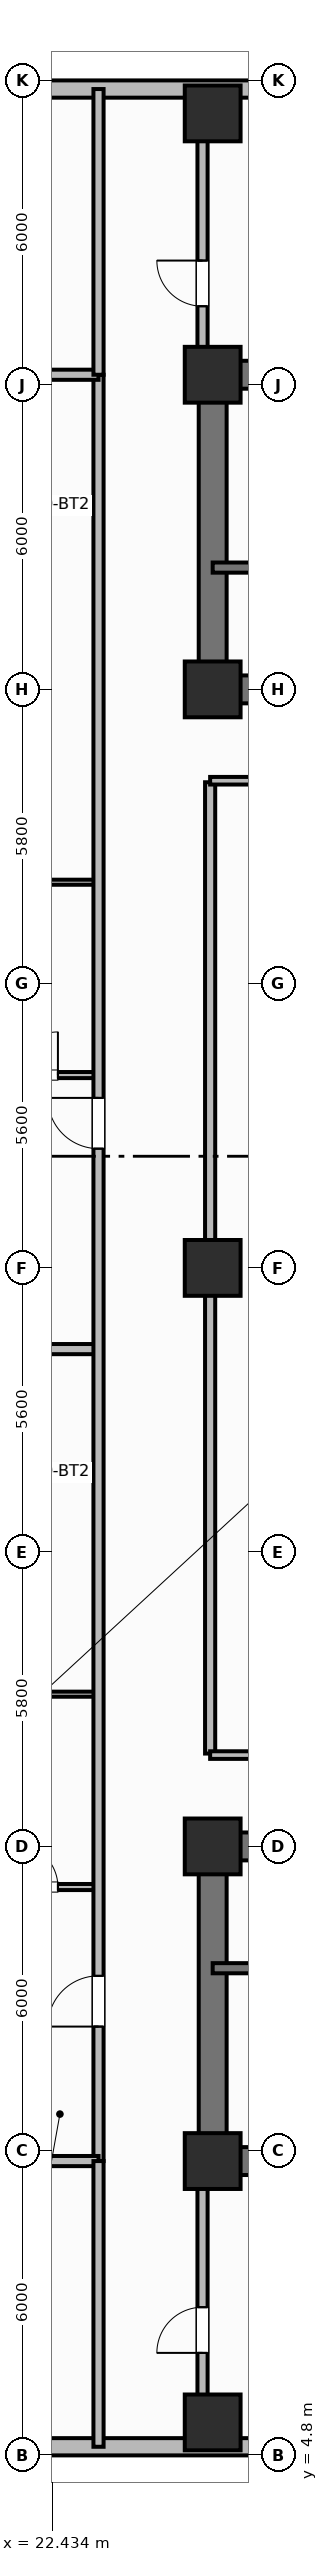
"""IFC4 building model, lengths in metres.
Left out: names, types, materials, properties, quantities, classifications, styles, units other than length and angle.
Written with IfcOpenShell. Run it as: python <this file> out.ifc"""

import sys

from ifc_helpers import new_model, si_unit, direction, frame, frame_2d, origin, origin_2d, place, context, subcontext, project, spatial, rectangle, extrude, element, fill, save


model = new_model("IFC4")
c1 = context("Model", 3, precision=1e-05, world=origin(), true_north=direction((0.0, 1.0)))
c2 = subcontext(c1, "Body", "Model", "MODEL_VIEW")
j1 = project(units=[si_unit("LENGTHUNIT", "METRE"), si_unit("PLANEANGLEUNIT", "RADIAN")], contexts=[c1])
p1 = place(None, origin())
s1 = spatial("IfcSite", under=j1, at=p1, CompositionType="ELEMENT")
p2 = place(p1, origin())
s2 = spatial("IfcBuilding", under=s1, at=p2, CompositionType="ELEMENT")
p3 = place(p2, frame((0.0, 0.0, 125.3)))
s3 = spatial("IfcBuildingStorey", under=s2, at=p3, CompositionType="ELEMENT", Elevation=125.3)
p4 = place(p3, frame((52.8, 10.6, 0.0), z_axis=(0.0, 0.0, 1.0), x_axis=(-1.0, 0.0, 0.0)))
e1 = element("IfcWall", 1, at=p4, inside=s3, PredefinedType="SHEAR", context=c2, shape_type="SweptSolid", body=[
    extrude(rectangle(XDim=27.2, YDim=0.55, at=frame_2d((13.6, 0.0))), origin(), (0.0, 0.0, 1.0), 3.7),
])
p5 = place(p3, frame((25.6, 10.875, 0.0), z_axis=(0.0, 0.0, 1.0), x_axis=(0.0, 1.0, 0.0)))
e2 = element("IfcWall", 2, at=p5, inside=s3, PredefinedType="SHEAR", context=c2, shape_type="SweptSolid", body=[
    extrude(rectangle(XDim=5.65, YDim=0.55, at=frame_2d((2.825, 0.0))), origin(), (0.0, 0.0, 1.0), 3.7),
])
p6 = place(p3, frame((25.6, 16.8, 0.0), z_axis=(0.0, 0.0, 1.0), x_axis=(1.0, 0.0, 0.0)))
e3 = element("IfcWall", 3, at=p6, inside=s3, PredefinedType="SHEAR", context=c2, shape_type="SweptSolid", body=[
    extrude(rectangle(XDim=27.2, YDim=0.55, at=frame_2d((13.6, 0.0))), origin(), (0.0, 0.0, 1.0), 3.7),
])
p7 = place(p6, frame((1.9, 0.0, 0.0)))
e4 = element("IfcOpeningElement", 4, at=p7, cuts=e3, PredefinedType="OPENING", context=c2, shape_type="SweptSolid", body=[
    extrude(rectangle(XDim=1.1, YDim=2.15, at=frame_2d((0.55, 1.075))), frame((0.0, 0.285, 0.0), z_axis=(0.0, -1.0, 0.0), x_axis=(1.0, 0.0, 0.0)), (0.0, 0.0, 1.0), 0.57),
])
p8 = place(p6, frame((13.0, 0.0, 0.0)))
e5 = element("IfcOpeningElement", 5, at=p8, cuts=e3, PredefinedType="OPENING", context=c2, shape_type="SweptSolid", body=[
    extrude(rectangle(XDim=1.2, YDim=2.15, at=frame_2d((0.6, 1.075))), frame((0.0, 0.285, 0.0), z_axis=(0.0, -1.0, 0.0), x_axis=(1.0, 0.0, 0.0)), (0.0, 0.0, 1.0), 0.57),
])
p9 = place(p6, frame((21.6, 0.0, 0.0)))
e6 = element("IfcOpeningElement", 6, at=p9, cuts=e3, PredefinedType="OPENING", context=c2, shape_type="SweptSolid", body=[
    extrude(rectangle(XDim=1.0, YDim=2.15, at=frame_2d((0.5, 1.075))), frame((0.0, 0.285, 0.0), z_axis=(0.0, -1.0, 0.0), x_axis=(1.0, 0.0, 0.0)), (0.0, 0.0, 1.0), 0.57),
])
p10 = place(p3, frame((25.6, 45.8, 0.0), z_axis=(0.0, 0.0, 1.0), x_axis=(1.0, 0.0, 0.0)))
e7 = element("IfcWall", 7, at=p10, inside=s3, PredefinedType="SHEAR", context=c2, shape_type="SweptSolid", body=[
    extrude(rectangle(XDim=27.2, YDim=0.55, at=frame_2d((13.6, 0.0))), origin(), (0.0, 0.0, 1.0), 3.7),
])
p11 = place(p3, frame((25.6, 39.875, 0.0), z_axis=(0.0, 0.0, 1.0), x_axis=(0.0, 1.0, 0.0)))
e8 = element("IfcWall", 8, at=p11, inside=s3, PredefinedType="SHEAR", context=c2, shape_type="SweptSolid", body=[
    extrude(rectangle(XDim=5.65, YDim=0.55, at=frame_2d((2.825, 0.0))), origin(), (0.0, 0.0, 1.0), 3.7),
])
p12 = place(p3, frame((52.8, 39.6, 0.0), z_axis=(0.0, 0.0, 1.0), x_axis=(-1.0, 0.0, 0.0)))
e9 = element("IfcWall", 9, at=p12, inside=s3, PredefinedType="SHEAR", context=c2, shape_type="SweptSolid", body=[
    extrude(rectangle(XDim=27.2, YDim=0.55, at=frame_2d((13.6, 0.0))), origin(), (0.0, 0.0, 1.0), 3.7),
])
p13 = place(p12, frame((24.2, 0.0, 0.0)))
e10 = element("IfcOpeningElement", 10, at=p13, cuts=e9, PredefinedType="OPENING", context=c2, shape_type="SweptSolid", body=[
    extrude(rectangle(XDim=1.1, YDim=2.15, at=frame_2d((0.55, 1.075))), frame((0.0, 0.285, 0.0), z_axis=(0.0, -1.0, 0.0), x_axis=(1.0, 0.0, 0.0)), (0.0, 0.0, 1.0), 0.57),
])
p14 = place(p12, frame((15.1, 0.0, 0.0)))
e11 = element("IfcOpeningElement", 11, at=p14, cuts=e9, PredefinedType="OPENING", context=c2, shape_type="SweptSolid", body=[
    extrude(rectangle(XDim=1.2, YDim=2.15, at=frame_2d((0.6, 1.075))), frame((0.0, 0.285, 0.0), z_axis=(0.0, -1.0, 0.0), x_axis=(1.0, 0.0, 0.0)), (0.0, 0.0, 1.0), 0.57),
])
p15 = place(p12, frame((11.3, 0.0, 0.0)))
e12 = element("IfcOpeningElement", 12, at=p15, cuts=e9, PredefinedType="OPENING", context=c2, shape_type="SweptSolid", body=[
    extrude(rectangle(XDim=1.3, YDim=2.2, at=frame_2d((0.65, 1.1))), frame((0.0, 0.285, 0.0), z_axis=(0.0, -1.0, 0.0), x_axis=(1.0, 0.0, 0.0)), (0.0, 0.0, 1.0), 0.57),
])
p16 = place(p12, frame((7.25, 0.0, 0.0)))
e13 = element("IfcOpeningElement", 13, at=p16, cuts=e9, PredefinedType="OPENING", context=c2, shape_type="SweptSolid", body=[
    extrude(rectangle(XDim=0.85, YDim=2.1, at=frame_2d((0.425, 1.05))), frame((0.0, 0.285, 0.0), z_axis=(0.0, -1.0, 0.0), x_axis=(1.0, 0.0, 0.0)), (0.0, 0.0, 1.0), 0.57),
])
p17 = place(p12, frame((3.0, 0.0, 0.0)))
e14 = element("IfcOpeningElement", 14, at=p17, cuts=e9, PredefinedType="OPENING", context=c2, shape_type="SweptSolid", body=[
    extrude(rectangle(XDim=0.9, YDim=2.1, at=frame_2d((0.45, 1.05))), frame((0.0, 0.285, 0.0), z_axis=(0.0, -1.0, 0.0), x_axis=(1.0, 0.0, 0.0)), (0.0, 0.0, 1.0), 0.57),
])
for number, where, z_axis, x_axis in (
    (15, (25.6, 10.6, 0.0), (0.0, 0.0, 1.0), (1.0, 0.0, 0.0)),
    (16, (25.6, 16.8, 0.0), (0.0, 0.0, 1.0), (1.0, 0.0, 0.0)),
    (17, (25.6, 39.6, 0.0), (0.0, 0.0, 1.0), (1.0, 0.0, 0.0)),
    (18, (25.6, 45.8, 0.0), (0.0, 0.0, 1.0), (1.0, 0.0, 0.0)),
    (19, (25.6, 28.2, 0.0), (0.0, 0.0, 1.0), (1.0, 0.0, 0.0)),
    (20, (25.6, 5.45, 0.0), (0.0, 0.0, 1.0), (1.0, 0.0, 0.0)),
    (21, (25.6, 50.95, 0.0), (0.0, 0.0, 1.0), (1.0, 0.0, 0.0)),
):
    element("IfcColumn", number, at=place(p3, frame(where, z_axis=z_axis, x_axis=x_axis)), inside=s3, PredefinedType="COLUMN", context=c2, shape_type="SweptSolid", body=[
        extrude(rectangle(XDim=1.1, YDim=1.1, at=origin_2d()), origin(), (0.0, 0.0, 1.0), 3.7),
    ])
p18 = place(p3, frame((18.6, 4.97, 0.0), z_axis=(0.0, 0.0, 1.0), x_axis=(1.0, 0.0, 0.0)))
e22 = element("IfcWall", 22, at=p18, inside=s3, PredefinedType="SOLIDWALL", context=c2, shape_type="SweptSolid", body=[
    extrude(rectangle(XDim=17.4, YDim=0.34, at=frame_2d((8.7, 0.0))), origin(), (0.0, 0.0, 1.0), 2.7),
])
p19 = place(p18, frame((1.46, 0.0, 0.68)))
e23 = element("IfcOpeningElement", 23, at=p19, cuts=e22, PredefinedType="OPENING", context=c2, shape_type="SweptSolid", body=[
    extrude(rectangle(XDim=1.6, YDim=1.9, at=frame_2d((0.8, 0.95))), frame((0.0, 0.18, 0.0), z_axis=(0.0, -1.0, 0.0), x_axis=(1.0, 0.0, 0.0)), (0.0, 0.0, 1.0), 0.36),
])
p20 = place(p18, frame((8.25, 0.0, 0.68)))
e24 = element("IfcOpeningElement", 24, at=p20, cuts=e22, PredefinedType="OPENING", context=c2, shape_type="SweptSolid", body=[
    extrude(rectangle(XDim=1.6, YDim=1.9, at=frame_2d((0.8, 0.95))), frame((0.0, 0.18, 0.0), z_axis=(0.0, -1.0, 0.0), x_axis=(1.0, 0.0, 0.0)), (0.0, 0.0, 1.0), 0.36),
])
p21 = place(p18, frame((10.77, 0.0, 0.68)))
e25 = element("IfcOpeningElement", 25, at=p21, cuts=e22, PredefinedType="OPENING", context=c2, shape_type="SweptSolid", body=[
    extrude(rectangle(XDim=1.6, YDim=1.9, at=frame_2d((0.8, 0.95))), frame((0.0, 0.18, 0.0), z_axis=(0.0, -1.0, 0.0), x_axis=(1.0, 0.0, 0.0)), (0.0, 0.0, 1.0), 0.36),
])
p22 = place(p18, frame((13.64, 0.0, 0.68)))
e26 = element("IfcOpeningElement", 26, at=p22, cuts=e22, PredefinedType="OPENING", context=c2, shape_type="SweptSolid", body=[
    extrude(rectangle(XDim=1.6, YDim=1.9, at=frame_2d((0.8, 0.95))), frame((0.0, 0.18, 0.0), z_axis=(0.0, -1.0, 0.0), x_axis=(1.0, 0.0, 0.0)), (0.0, 0.0, 1.0), 0.36),
])
p23 = place(p3, frame((36.0, 51.43, 0.0), z_axis=(0.0, 0.0, 1.0), x_axis=(-1.0, 0.0, 0.0)))
e27 = element("IfcWall", 27, at=p23, inside=s3, PredefinedType="SOLIDWALL", context=c2, shape_type="SweptSolid", body=[
    extrude(rectangle(XDim=17.4, YDim=0.34, at=frame_2d((8.7, 0.0))), origin(), (0.0, 0.0, 1.0), 2.7),
])
p24 = place(p23, frame((5.637, 0.0, 0.68)))
e28 = element("IfcOpeningElement", 28, at=p24, cuts=e27, PredefinedType="OPENING", context=c2, shape_type="SweptSolid", body=[
    extrude(rectangle(XDim=2.1, YDim=1.9, at=frame_2d((1.05, 0.95))), frame((0.0, 0.18, 0.0), z_axis=(0.0, -1.0, 0.0), x_axis=(1.0, 0.0, 0.0)), (0.0, 0.0, 1.0), 0.36),
])
p25 = place(p23, frame((13.688, 0.0, 0.68)))
e29 = element("IfcOpeningElement", 29, at=p25, cuts=e27, PredefinedType="OPENING", context=c2, shape_type="SweptSolid", body=[
    extrude(rectangle(XDim=2.1, YDim=1.9, at=frame_2d((1.05, 0.95))), frame((0.0, 0.18, 0.0), z_axis=(0.0, -1.0, 0.0), x_axis=(1.0, 0.0, 0.0)), (0.0, 0.0, 1.0), 0.36),
])
p26 = place(p3, frame((25.6, 14.4, 0.0), z_axis=(0.0, 0.0, 1.0), x_axis=(1.0, 0.0, 0.0)))
e30 = element("IfcWall", 30, at=p26, inside=s3, PredefinedType="SHEAR", context=c2, shape_type="SweptSolid", body=[
    extrude(rectangle(XDim=9.55, YDim=0.2, at=frame_2d((4.775, 0.0))), origin(), (0.0, 0.0, 1.0), 3.7),
])
p27 = place(p26, frame((1.05, 0.0, 0.0)))
e31 = element("IfcOpeningElement", 31, at=p27, cuts=e30, PredefinedType="OPENING", context=c2, shape_type="SweptSolid", body=[
    extrude(rectangle(XDim=1.1, YDim=2.15, at=frame_2d((0.55, 1.075))), frame((0.0, 0.11, 0.0), z_axis=(0.0, -1.0, 0.0), x_axis=(1.0, 0.0, 0.0)), (0.0, 0.0, 1.0), 0.22),
])
p28 = place(p3, frame((35.15, 42.0, 0.0), z_axis=(0.0, 0.0, 1.0), x_axis=(-1.0, 0.0, 0.0)))
e32 = element("IfcWall", 32, at=p28, inside=s3, PredefinedType="SHEAR", context=c2, shape_type="SweptSolid", body=[
    extrude(rectangle(XDim=9.55, YDim=0.2, at=frame_2d((4.775, 0.0))), origin(), (0.0, 0.0, 1.0), 3.7),
])
p29 = place(p28, frame((7.25, 0.0, 0.0)))
e33 = element("IfcOpeningElement", 33, at=p29, cuts=e32, PredefinedType="OPENING", context=c2, shape_type="SweptSolid", body=[
    extrude(rectangle(XDim=1.1, YDim=2.15, at=frame_2d((0.55, 1.075))), frame((0.0, 0.11, 0.0), z_axis=(0.0, -1.0, 0.0), x_axis=(1.0, 0.0, 0.0)), (0.0, 0.0, 1.0), 0.22),
])
p30 = place(p3, frame((25.55, 18.63, 0.0), z_axis=(0.0, 0.0, 1.0), x_axis=(0.0, 1.0, 0.0)))
e34 = element("IfcWall", 34, at=p30, inside=s3, PredefinedType="PARTITIONING", context=c2, shape_type="SweptSolid", body=[
    extrude(rectangle(XDim=19.14, YDim=0.2, at=frame_2d((9.57, 0.0))), origin(), (0.0, 0.0, 1.0), 2.53),
])
for number, where, z_axis, x_axis in (
    (35, (25.55, 18.6, 0.0), (0.0, 0.0, 1.0), (1.0, 0.0, 0.0)),
    (36, (25.55, 37.8, 0.0), (0.0, 0.0, 1.0), (1.0, 0.0, 0.0)),
):
    element("IfcWall", number, at=place(p3, frame(where, z_axis=z_axis, x_axis=x_axis)), inside=s3, PredefinedType="PARTITIONING", context=c2, shape_type="SweptSolid", body=[
        extrude(rectangle(XDim=6.5, YDim=0.15, at=frame_2d((3.25, 0.0))), origin(), (0.0, 0.0, 1.0), 2.53),
    ])
p31 = place(p3, frame((21.1, 16.0, 0.0), z_axis=(0.0, 0.0, 1.0), x_axis=(1.0, 0.0, 0.0)))
e37 = element("IfcWall", 37, at=p31, inside=s3, PredefinedType="PARTITIONING", context=c2, shape_type="SweptSolid", body=[
    extrude(rectangle(XDim=2.25, YDim=0.12, at=frame_2d((1.125, 0.0))), origin(), (0.0, 0.0, 1.0), 2.53),
])
p32 = place(p31, frame((0.6, 0.0, 0.0)))
e38 = element("IfcOpeningElement", 38, at=p32, cuts=e37, PredefinedType="OPENING", context=c2, shape_type="SweptSolid", body=[
    extrude(rectangle(XDim=0.85, YDim=2.1, at=frame_2d((0.425, 1.05))), frame((0.0, 0.07, 0.0), z_axis=(0.0, -1.0, 0.0), x_axis=(1.0, 0.0, 0.0)), (0.0, 0.0, 1.0), 0.14),
])
p33 = place(p3, frame((21.1, 19.8, 0.0), z_axis=(0.0, 0.0, 1.0), x_axis=(1.0, 0.0, 0.0)))
e39 = element("IfcWall", 39, at=p33, inside=s3, PredefinedType="PARTITIONING", context=c2, shape_type="SweptSolid", body=[
    extrude(rectangle(XDim=2.25, YDim=0.1, at=frame_2d((1.125, 0.0))), origin(), (0.0, 0.0, 1.0), 2.53),
])
p34 = place(p3, frame((14.999, 26.6, 0.0), z_axis=(0.0, 0.0, 1.0), x_axis=(1.0, 0.0, 0.0)))
e40 = element("IfcWall", 40, at=p34, inside=s3, PredefinedType="PARTITIONING", context=c2, shape_type="SweptSolid", body=[
    extrude(rectangle(XDim=8.352, YDim=0.2, at=frame_2d((4.176, 0.0))), origin(), (0.0, 0.0, 1.0), 2.53),
])
p35 = place(p3, frame((21.1, 32.0, 0.0), z_axis=(0.0, 0.0, 1.0), x_axis=(1.0, 0.0, 0.0)))
e41 = element("IfcWall", 41, at=p35, inside=s3, PredefinedType="PARTITIONING", context=c2, shape_type="SweptSolid", body=[
    extrude(rectangle(XDim=2.25, YDim=0.12, at=frame_2d((1.125, 0.0))), origin(), (0.0, 0.0, 1.0), 2.53),
])
p36 = place(p35, frame((0.6, 0.0, 0.0)))
e42 = element("IfcOpeningElement", 42, at=p36, cuts=e41, PredefinedType="OPENING", context=c2, shape_type="SweptSolid", body=[
    extrude(rectangle(XDim=0.85, YDim=2.1, at=frame_2d((0.425, 1.05))), frame((0.0, 0.07, 0.0), z_axis=(0.0, -1.0, 0.0), x_axis=(1.0, 0.0, 0.0)), (0.0, 0.0, 1.0), 0.14),
])
p37 = place(p3, frame((21.1, 35.8, 0.0), z_axis=(0.0, 0.0, 1.0), x_axis=(1.0, 0.0, 0.0)))
e43 = element("IfcWall", 43, at=p37, inside=s3, PredefinedType="PARTITIONING", context=c2, shape_type="SweptSolid", body=[
    extrude(rectangle(XDim=2.25, YDim=0.1, at=frame_2d((1.125, 0.0))), origin(), (0.0, 0.0, 1.0), 2.53),
])
p38 = place(p3, frame((23.35, 10.6, 0.0), z_axis=(0.0, 0.0, 1.0), x_axis=(0.0, 1.0, 0.0)))
e44 = element("IfcWall", 44, at=p38, inside=s3, PredefinedType="PARTITIONING", context=c2, shape_type="SweptSolid", body=[
    extrude(rectangle(XDim=35.2, YDim=0.2, at=frame_2d((17.6, 0.0))), origin(), (0.0, 0.0, 1.0), 2.53),
])
p39 = place(p38, frame((2.65, 0.0, 0.0)))
e45 = element("IfcOpeningElement", 45, at=p39, cuts=e44, PredefinedType="OPENING", context=c2, shape_type="SweptSolid", body=[
    extrude(rectangle(XDim=1.0, YDim=2.15, at=frame_2d((0.5, 1.075))), frame((0.0, 0.11, 0.0), z_axis=(0.0, -1.0, 0.0), x_axis=(1.0, 0.0, 0.0)), (0.0, 0.0, 1.0), 0.22),
])
p40 = place(p38, frame((19.95, 0.0, 0.0)))
e46 = element("IfcOpeningElement", 46, at=p40, cuts=e44, PredefinedType="OPENING", context=c2, shape_type="SweptSolid", body=[
    extrude(rectangle(XDim=1.0, YDim=2.15, at=frame_2d((0.5, 1.075))), frame((0.0, 0.11, 0.0), z_axis=(0.0, -1.0, 0.0), x_axis=(1.0, 0.0, 0.0)), (0.0, 0.0, 1.0), 0.22),
])
for number, where, z_axis, x_axis in (
    (47, (14.99, 10.6, 0.0), (0.0, 0.0, 1.0), (1.0, 0.0, 0.0)),
    (48, (14.99, 45.8, 0.0), (0.0, 0.0, 1.0), (1.0, 0.0, 0.0)),
):
    element("IfcWall", number, at=place(p3, frame(where, z_axis=z_axis, x_axis=x_axis)), inside=s3, PredefinedType="PARTITIONING", context=c2, shape_type="SweptSolid", body=[
        extrude(rectangle(XDim=8.36, YDim=0.2, at=frame_2d((4.18, 0.0))), origin(), (0.0, 0.0, 1.0), 2.53),
    ])
p41 = place(p3, frame((23.35, 4.97, 0.0), z_axis=(0.0, 0.0, 1.0), x_axis=(0.0, 1.0, 0.0)))
e49 = element("IfcWall", 49, at=p41, inside=s3, PredefinedType="PARTITIONING", context=c2, shape_type="SweptSolid", body=[
    extrude(rectangle(XDim=5.63, YDim=0.2, at=frame_2d((2.815, 0.0))), origin(), (0.0, 0.0, 1.0), 2.53),
])
p42 = place(p3, frame((23.35, 45.8, 0.0), z_axis=(0.0, 0.0, 1.0), x_axis=(0.0, 1.0, 0.0)))
e50 = element("IfcWall", 50, at=p42, inside=s3, PredefinedType="PARTITIONING", context=c2, shape_type="SweptSolid", body=[
    extrude(rectangle(XDim=5.63, YDim=0.2, at=frame_2d((2.815, 0.0))), origin(), (0.0, 0.0, 1.0), 2.53),
])
p43 = place(p3, frame((25.4, 5.77, 0.0), z_axis=(0.0, 0.0, 1.0), x_axis=(0.0, 1.0, 0.0)))
e51 = element("IfcWall", 51, at=p43, inside=s3, PredefinedType="PARTITIONING", context=c2, shape_type="SweptSolid", body=[
    extrude(rectangle(XDim=4.53, YDim=0.2, at=frame_2d((2.265, 0.0))), origin(), (0.0, 0.0, 1.0), 2.53),
])
p44 = place(p43, frame((1.05, 0.0, 0.0)))
e52 = element("IfcOpeningElement", 52, at=p44, cuts=e51, PredefinedType="OPENING", context=c2, shape_type="SweptSolid", body=[
    extrude(rectangle(XDim=0.9, YDim=2.1, at=frame_2d((0.45, 1.05))), frame((0.0, 0.11, 0.0), z_axis=(0.0, -1.0, 0.0), x_axis=(1.0, 0.0, 0.0)), (0.0, 0.0, 1.0), 0.22),
])
p45 = place(p3, frame((25.4, 46.1, 0.0), z_axis=(0.0, 0.0, 1.0), x_axis=(0.0, 1.0, 0.0)))
e53 = element("IfcWall", 53, at=p45, inside=s3, PredefinedType="PARTITIONING", context=c2, shape_type="SweptSolid", body=[
    extrude(rectangle(XDim=4.53, YDim=0.2, at=frame_2d((2.265, 0.0))), origin(), (0.0, 0.0, 1.0), 2.53),
])
p46 = place(p45, frame((1.05, 0.0, 0.0)))
e54 = element("IfcOpeningElement", 54, at=p46, cuts=e53, PredefinedType="OPENING", context=c2, shape_type="SweptSolid", body=[
    extrude(rectangle(XDim=0.9, YDim=2.1, at=frame_2d((0.45, 1.05))), frame((0.0, 0.11, 0.0), z_axis=(0.0, -1.0, 0.0), x_axis=(1.0, 0.0, 0.0)), (0.0, 0.0, 1.0), 0.22),
])
p47 = place(p32, origin())
e55 = element("IfcDoor", 55, at=p47, inside=s3, OperationType="SINGLE_SWING_LEFT", PredefinedType="DOOR", context=c2, shape_type="SweptSolid", body=[
    extrude(rectangle(XDim=0.85, YDim=2.1, at=frame_2d((0.425, 1.05))), frame((0.0, 0.025, 0.0), z_axis=(0.0, -1.0, 0.0), x_axis=(1.0, 0.0, 0.0)), (0.0, 0.0, 1.0), 0.05),
])
fill(e38, e55)
p48 = place(p36, origin())
e56 = element("IfcDoor", 56, at=p48, inside=s3, OperationType="SINGLE_SWING_RIGHT", PredefinedType="DOOR", context=c2, shape_type="SweptSolid", body=[
    extrude(rectangle(XDim=0.85, YDim=2.1, at=frame_2d((0.425, 1.05))), frame((0.0, 0.025, 0.0), z_axis=(0.0, -1.0, 0.0), x_axis=(1.0, 0.0, 0.0)), (0.0, 0.0, 1.0), 0.05),
])
fill(e42, e56)
p49 = place(p39, origin())
e57 = element("IfcDoor", 57, at=p49, inside=s3, OperationType="SINGLE_SWING_LEFT", PredefinedType="DOOR", context=c2, shape_type="SweptSolid", body=[
    extrude(rectangle(XDim=1.0, YDim=2.15, at=frame_2d((0.5, 1.075))), frame((0.0, 0.025, 0.0), z_axis=(0.0, -1.0, 0.0), x_axis=(1.0, 0.0, 0.0)), (0.0, 0.0, 1.0), 0.05),
])
fill(e45, e57)
p50 = place(p40, origin())
e58 = element("IfcDoor", 58, at=p50, inside=s3, OperationType="SINGLE_SWING_RIGHT", PredefinedType="DOOR", context=c2, shape_type="SweptSolid", body=[
    extrude(rectangle(XDim=1.0, YDim=2.15, at=frame_2d((0.5, 1.075))), frame((0.0, 0.025, 0.0), z_axis=(0.0, -1.0, 0.0), x_axis=(1.0, 0.0, 0.0)), (0.0, 0.0, 1.0), 0.05),
])
fill(e46, e58)
p51 = place(p44, origin())
e59 = element("IfcDoor", 59, at=p51, inside=s3, OperationType="SINGLE_SWING_LEFT", PredefinedType="DOOR", context=c2, shape_type="SweptSolid", body=[
    extrude(rectangle(XDim=0.9, YDim=2.1, at=frame_2d((0.45, 1.05))), frame((0.0, 0.025, 0.0), z_axis=(0.0, -1.0, 0.0), x_axis=(1.0, 0.0, 0.0)), (0.0, 0.0, 1.0), 0.05),
])
fill(e52, e59)
p52 = place(p46, origin())
e60 = element("IfcDoor", 60, at=p52, inside=s3, OperationType="SINGLE_SWING_RIGHT", PredefinedType="DOOR", context=c2, shape_type="SweptSolid", body=[
    extrude(rectangle(XDim=0.9, YDim=2.1, at=frame_2d((0.45, 1.05))), frame((0.0, 0.025, 0.0), z_axis=(0.0, -1.0, 0.0), x_axis=(1.0, 0.0, 0.0)), (0.0, 0.0, 1.0), 0.05),
])
fill(e54, e60)
save(model, sys.argv[1])
